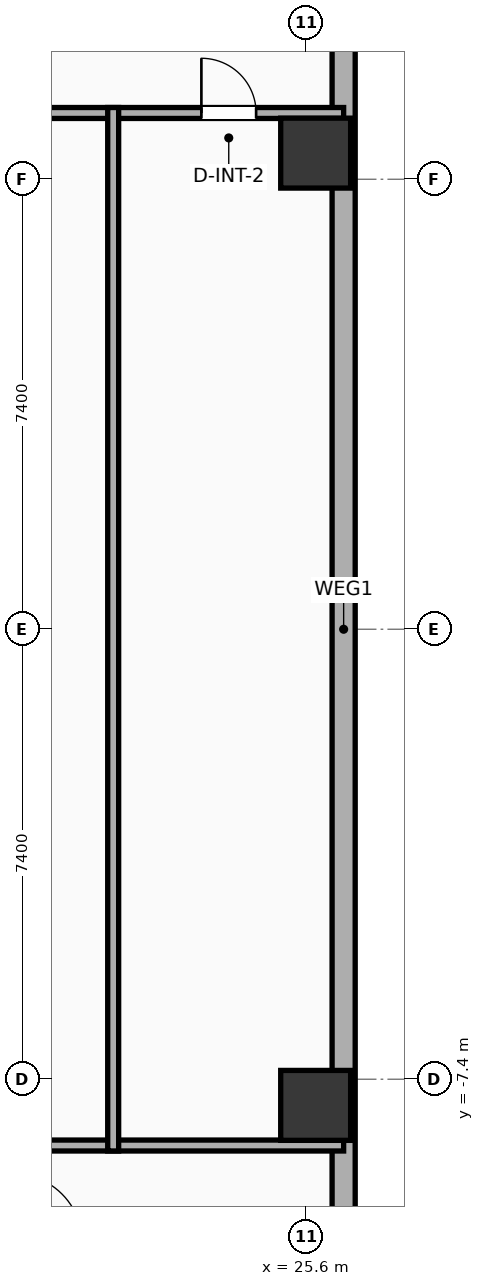
"""IFC4 building model, lengths in metres.
Left out: names, types, materials, properties, quantities, classifications, styles, units other than length and angle.
Written with IfcOpenShell. Run it as: python <this file> out.ifc"""

import sys

from ifc_helpers import new_model, si_unit, direction, frame, frame_2d, origin, origin_2d, place, context, subcontext, project, spatial, rectangle, hollow_rectangle, extrude, element, fill, save


model = new_model("IFC4")
c1 = context("Model", 3, precision=1e-05, world=origin(), true_north=direction((0.0, 1.0)))
c2 = subcontext(c1, "Body", "Model", "MODEL_VIEW")
j1 = project(units=[si_unit("LENGTHUNIT", "METRE"), si_unit("PLANEANGLEUNIT", "RADIAN")], contexts=[c1])
p1 = place(None, origin())
s1 = spatial("IfcSite", under=j1, at=p1, CompositionType="ELEMENT")
p2 = place(p1, origin())
s2 = spatial("IfcBuilding", under=s1, at=p2, CompositionType="ELEMENT")
p3 = place(p2, frame((0.0, 0.0, 41.6)))
s3 = spatial("IfcBuildingStorey", under=s2, at=p3, CompositionType="ELEMENT", Elevation=41.6)
for number, where, z_axis, x_axis in (
    (1, (25.75, -7.83, 0.0), (0.0, 0.0, 1.0), (1.0, 0.0, 0.0)),
    (2, (25.75, 7.83, 0.0), (0.0, 0.0, 1.0), (1.0, 0.0, 0.0)),
):
    element("IfcColumn", number, at=place(p3, frame(where, z_axis=z_axis, x_axis=x_axis)), inside=s3, PredefinedType="COLUMN", context=c2, shape_type="SweptSolid", body=[
        extrude(hollow_rectangle(XDim=1.15, YDim=1.15, WallThickness=0.04, at=origin_2d()), origin(), (0.0, 0.0, 1.0), 3.9),
    ])
p4 = place(p3, frame((26.21, 18.381, 0.0), z_axis=(0.0, 0.0, 1.0), x_axis=(0.0, -1.0, 0.0)))
e3 = element("IfcWall", 3, at=p4, inside=s3, PredefinedType="ELEMENTEDWALL", context=c2, shape_type="SweptSolid", body=[
    extrude(rectangle(XDim=36.763, YDim=0.38, at=frame_2d((18.381, 0.0))), origin(), (0.0, 0.0, 1.0), 3.65),
])
p5 = place(p3, frame((9.88, 8.49, 0.0), z_axis=(0.0, 0.0, 1.0), x_axis=(1.0, 0.0, 0.0)))
e4 = element("IfcWall", 4, at=p5, inside=s3, PredefinedType="PARTITIONING", context=c2, shape_type="SweptSolid", body=[
    extrude(rectangle(XDim=16.33, YDim=0.18, at=frame_2d((8.165, 0.0))), origin(), (0.0, 0.0, 1.0), 3.65),
])
p6 = place(p5, frame((13.99, 0.0, 0.0)))
e5 = element("IfcOpeningElement", 5, at=p6, cuts=e4, PredefinedType="OPENING", context=c2, shape_type="SweptSolid", body=[
    extrude(rectangle(XDim=0.9, YDim=2.05, at=frame_2d((0.45, 1.025))), frame((0.0, 0.1, 0.0), z_axis=(0.0, -1.0, 0.0), x_axis=(1.0, 0.0, 0.0)), (0.0, 0.0, 1.0), 0.2),
])
p7 = place(p3, frame((9.88, -8.49, 0.0), z_axis=(0.0, 0.0, 1.0), x_axis=(1.0, 0.0, 0.0)))
e6 = element("IfcWall", 6, at=p7, inside=s3, PredefinedType="PARTITIONING", context=c2, shape_type="SweptSolid", body=[
    extrude(rectangle(XDim=16.33, YDim=0.18, at=frame_2d((8.165, 0.0))), origin(), (0.0, 0.0, 1.0), 3.65),
])
p8 = place(p3, frame((22.42, -8.58, 0.0), z_axis=(0.0, 0.0, 1.0), x_axis=(0.0, 1.0, 0.0)))
e7 = element("IfcWall", 7, at=p8, inside=s3, PredefinedType="PARTITIONING", context=c2, shape_type="SweptSolid", body=[
    extrude(rectangle(XDim=17.16, YDim=0.18, at=frame_2d((8.58, 0.0))), origin(), (0.0, 0.0, 1.0), 3.65),
])
p9 = place(p6, origin())
e8 = element("IfcDoor", 8, at=p9, inside=s3, OperationType="SINGLE_SWING_LEFT", PredefinedType="DOOR", context=c2, shape_type="SweptSolid", body=[
    extrude(rectangle(XDim=0.9, YDim=2.05, at=frame_2d((0.45, 1.025))), frame((0.0, 0.025, 0.0), z_axis=(0.0, -1.0, 0.0), x_axis=(1.0, 0.0, 0.0)), (0.0, 0.0, 1.0), 0.05),
])
fill(e5, e8)
save(model, sys.argv[1])
